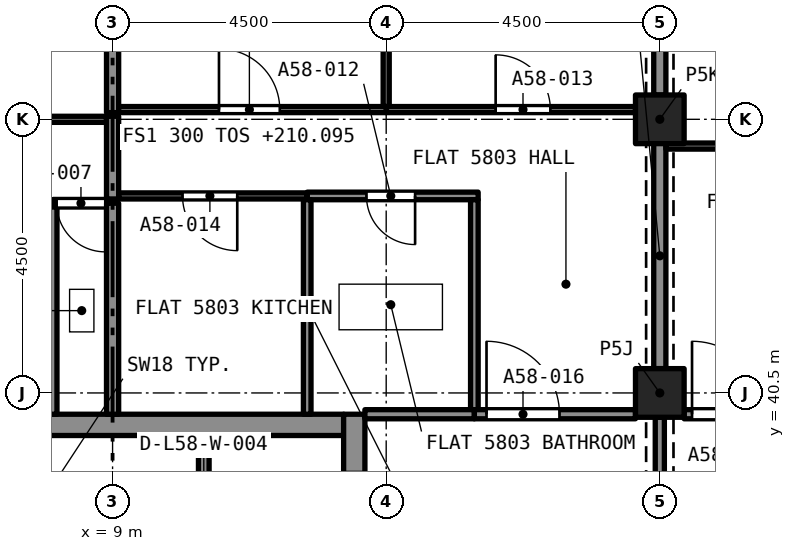
"""IFC4 building model, lengths in metres.
Left out: names, types, materials, properties, quantities, classifications, styles, units other than length and angle.
Written with IfcOpenShell. Run it as: python <this file> out.ifc"""

import sys

from ifc_helpers import new_model, si_unit, direction, frame, frame_2d, origin, origin_2d, place, context, subcontext, project, spatial, rectangle, extrude, element, fill, save


model = new_model("IFC4")
c1 = context("Model", 3, precision=1e-05, world=origin(), true_north=direction((0.0, 1.0)))
c2 = subcontext(c1, "Body", "Model", "MODEL_VIEW")
j1 = project(units=[si_unit("LENGTHUNIT", "METRE"), si_unit("PLANEANGLEUNIT", "RADIAN")], contexts=[c1])
p1 = place(None, origin())
s1 = spatial("IfcSite", under=j1, at=p1, CompositionType="ELEMENT")
p2 = place(p1, origin())
s2 = spatial("IfcBuilding", under=s1, at=p2, CompositionType="ELEMENT")
p3 = place(p2, frame((0.0, 0.0, 210.095)))
s3 = spatial("IfcBuildingStorey", under=s2, at=p3, CompositionType="ELEMENT", Elevation=210.095)
for number, where, z_axis, x_axis in (
    (1, (18.0, 40.5, 0.0), (0.0, 0.0, 1.0), (1.0, 0.0, 0.0)),
    (2, (18.0, 45.0, 0.0), (0.0, 0.0, 1.0), (1.0, 0.0, 0.0)),
):
    element("IfcColumn", number, at=place(p3, frame(where, z_axis=z_axis, x_axis=x_axis)), inside=s3, PredefinedType="COLUMN", context=c2, shape_type="SweptSolid", body=[
        extrude(rectangle(XDim=0.8, YDim=0.8, at=origin_2d()), origin(), (0.0, 0.0, 1.0), 3.2),
    ])
p4 = place(p3, frame((5.2, 39.975, 0.0), z_axis=(0.0, 0.0, 1.0), x_axis=(1.0, 0.0, 0.0)))
e3 = element("IfcWall", 3, at=p4, inside=s3, PredefinedType="SOLIDWALL", context=c2, shape_type="SweptSolid", body=[
    extrude(rectangle(XDim=7.6, YDim=0.35, at=frame_2d((3.8, 0.0))), origin(), (0.0, 0.0, 1.0), 3.2),
])
p5 = place(p3, frame((12.975, 27.35, 0.0), z_axis=(0.0, 0.0, 1.0), x_axis=(0.0, 1.0, 0.0)))
e4 = element("IfcWall", 4, at=p5, inside=s3, PredefinedType="SOLIDWALL", context=c2, shape_type="SweptSolid", body=[
    extrude(rectangle(XDim=12.8, YDim=0.35, at=frame_2d((6.4, 0.0))), origin(), (0.0, 0.0, 1.0), 3.2),
])
p6 = place(p5, frame((10.75, 0.0, 0.0)))
e5 = element("IfcOpeningElement", 5, at=p6, cuts=e4, PredefinedType="OPENING", context=c2, shape_type="SweptSolid", body=[
    extrude(rectangle(XDim=1.1, YDim=2.1, at=frame_2d((0.55, 1.05))), frame((0.0, 0.185, 0.0), z_axis=(0.0, -1.0, 0.0), x_axis=(1.0, 0.0, 0.0)), (0.0, 0.0, 1.0), 0.37),
])
p7 = place(p5, frame((8.6, 0.0, 0.0)))
e6 = element("IfcOpeningElement", 6, at=p7, cuts=e4, PredefinedType="OPENING", context=c2, shape_type="SweptSolid", body=[
    extrude(rectangle(XDim=1.2, YDim=2.1, at=frame_2d((0.6, 1.05))), frame((0.0, 0.185, 0.0), z_axis=(0.0, -1.0, 0.0), x_axis=(1.0, 0.0, 0.0)), (0.0, 0.0, 1.0), 0.37),
])
p8 = place(p3, frame((9.0, 43.62, 0.0), z_axis=(0.0, 0.0, 1.0), x_axis=(-1.0, 0.0, 0.0)))
e7 = element("IfcWall", 7, at=p8, inside=s3, PredefinedType="PARTITIONING", context=c2, shape_type="SweptSolid", body=[
    extrude(rectangle(XDim=0.977, YDim=0.125, at=frame_2d((0.489, 0.0))), origin(), (0.0, 0.0, 1.0), 2.9),
])
p9 = place(p8, frame((0.12, 0.0, 0.0)))
e8 = element("IfcOpeningElement", 8, at=p9, cuts=e7, PredefinedType="OPENING", context=c2, shape_type="SweptSolid", body=[
    extrude(rectangle(XDim=0.8, YDim=2.1, at=frame_2d((0.4, 1.05))), frame((0.0, 0.073, 0.0), z_axis=(0.0, -1.0, 0.0), x_axis=(1.0, 0.0, 0.0)), (0.0, 0.0, 1.0), 0.145),
])
p10 = place(p3, frame((8.023, 40.15, 0.0), z_axis=(0.0, 0.0, 1.0), x_axis=(0.0, 1.0, 0.0)))
e9 = element("IfcWall", 9, at=p10, inside=s3, PredefinedType="PARTITIONING", context=c2, shape_type="SweptSolid", body=[
    extrude(rectangle(XDim=3.408, YDim=0.125, at=frame_2d((1.704, 0.0))), origin(), (0.0, 0.0, 1.0), 2.9),
])
p11 = place(p3, frame((9.0, 40.15, 0.0), z_axis=(0.0, 0.0, 1.0), x_axis=(0.0, 1.0, 0.0)))
e10 = element("IfcWall", 10, at=p11, inside=s3, PredefinedType="PARTITIONING", context=c2, shape_type="SweptSolid", body=[
    extrude(rectangle(XDim=3.47, YDim=0.2, at=frame_2d((1.735, 0.0))), origin(), (0.0, 0.0, 1.0), 2.9),
])
p12 = place(p3, frame((4.5, 45.0, 0.0), z_axis=(0.0, 0.0, 1.0), x_axis=(1.0, 0.0, 0.0)))
e11 = element("IfcWall", 11, at=p12, inside=s3, PredefinedType="PARTITIONING", context=c2, shape_type="SweptSolid", body=[
    extrude(rectangle(XDim=4.4, YDim=0.1, at=frame_2d((2.2, 0.0))), origin(), (0.0, 0.0, 1.0), 2.9),
])
p13 = place(p12, frame((1.8, 0.0, 0.0)))
e12 = element("IfcOpeningElement", 12, at=p13, cuts=e11, PredefinedType="OPENING", context=c2, shape_type="SweptSolid", body=[
    extrude(rectangle(XDim=0.9, YDim=2.1, at=frame_2d((0.45, 1.05))), frame((0.0, 0.06, 0.0), z_axis=(0.0, -1.0, 0.0), x_axis=(1.0, 0.0, 0.0)), (0.0, 0.0, 1.0), 0.12),
])
p14 = place(p3, frame((9.0, 45.11, 0.0), z_axis=(0.0, 0.0, 1.0), x_axis=(0.0, 1.0, 0.0)))
e13 = element("IfcWall", 13, at=p14, inside=s3, PredefinedType="PARTITIONING", context=c2, shape_type="SweptSolid", body=[
    extrude(rectangle(XDim=3.99, YDim=0.2, at=frame_2d((1.995, 0.0))), origin(), (0.0, 0.0, 1.0), 2.9),
])
p15 = place(p3, frame((8.023, 43.62, 0.0), z_axis=(0.0, 0.0, 1.0), x_axis=(-1.0, 0.0, 0.0)))
e14 = element("IfcWall", 14, at=p15, inside=s3, PredefinedType="PARTITIONING", context=c2, shape_type="SweptSolid", body=[
    extrude(rectangle(XDim=1.223, YDim=0.1, at=frame_2d((0.611, 0.0))), origin(), (0.0, 0.0, 1.0), 2.9),
])
p16 = place(p15, frame((0.136, 0.0, 0.0)))
e15 = element("IfcOpeningElement", 15, at=p16, cuts=e14, PredefinedType="OPENING", context=c2, shape_type="SweptSolid", body=[
    extrude(rectangle(XDim=0.9, YDim=2.1, at=frame_2d((0.45, 1.05))), frame((0.0, 0.06, 0.0), z_axis=(0.0, -1.0, 0.0), x_axis=(1.0, 0.0, 0.0)), (0.0, 0.0, 1.0), 0.12),
])
p17 = place(p3, frame((9.0, 43.69, 0.0), z_axis=(0.0, 0.0, 1.0), x_axis=(0.0, 1.0, 0.0)))
e16 = element("IfcWall", 16, at=p17, inside=s3, PredefinedType="PARTITIONING", context=c2, shape_type="SweptSolid", body=[
    extrude(rectangle(XDim=1.36, YDim=0.2, at=frame_2d((0.68, 0.0))), origin(), (0.0, 0.0, 1.0), 2.9),
])
p18 = place(p3, frame((15.012, 43.74, 0.0), z_axis=(0.0, 0.0, 1.0), x_axis=(-1.0, 0.0, 0.0)))
e17 = element("IfcWall", 17, at=p18, inside=s3, PredefinedType="PARTITIONING", context=c2, shape_type="SweptSolid", body=[
    extrude(rectangle(XDim=2.812, YDim=0.125, at=frame_2d((1.406, 0.0))), origin(), (0.0, 0.0, 1.0), 2.9),
])
p19 = place(p18, frame((1.037, 0.0, 0.0)))
e18 = element("IfcOpeningElement", 18, at=p19, cuts=e17, PredefinedType="OPENING", context=c2, shape_type="SweptSolid", body=[
    extrude(rectangle(XDim=0.8, YDim=2.1, at=frame_2d((0.4, 1.05))), frame((0.0, 0.073, 0.0), z_axis=(0.0, -1.0, 0.0), x_axis=(1.0, 0.0, 0.0)), (0.0, 0.0, 1.0), 0.145),
])
p20 = place(p3, frame((14.95, 40.225, 0.0), z_axis=(0.0, 0.0, 1.0), x_axis=(0.0, 1.0, 0.0)))
e19 = element("IfcWall", 19, at=p20, inside=s3, PredefinedType="PARTITIONING", context=c2, shape_type="SweptSolid", body=[
    extrude(rectangle(XDim=3.452, YDim=0.125, at=frame_2d((1.726, 0.0))), origin(), (0.0, 0.0, 1.0), 2.9),
])
p21 = place(p3, frame((12.201, 40.15, 0.0), z_axis=(0.0, 0.0, 1.0), x_axis=(0.0, 1.0, 0.0)))
e20 = element("IfcWall", 20, at=p21, inside=s3, PredefinedType="PARTITIONING", context=c2, shape_type="SweptSolid", body=[
    extrude(rectangle(XDim=3.528, YDim=0.125, at=frame_2d((1.764, 0.0))), origin(), (0.0, 0.0, 1.0), 2.9),
])
p22 = place(p3, frame((13.15, 40.15, 0.0), z_axis=(0.0, 0.0, 1.0), x_axis=(1.0, 0.0, 0.0)))
e21 = element("IfcWall", 21, at=p22, inside=s3, PredefinedType="PARTITIONING", context=c2, shape_type="SweptSolid", body=[
    extrude(rectangle(XDim=1.8, YDim=0.15, at=frame_2d((0.9, 0.0))), origin(), (0.0, 0.0, 1.0), 2.9),
])
p23 = place(p3, frame((13.5, 45.16, 0.0), z_axis=(0.0, 0.0, 1.0), x_axis=(1.0, 0.0, 0.0)))
e22 = element("IfcWall", 22, at=p23, inside=s3, PredefinedType="PARTITIONING", context=c2, shape_type="SweptSolid", body=[
    extrude(rectangle(XDim=4.1, YDim=0.1, at=frame_2d((2.05, 0.0))), origin(), (0.0, 0.0, 1.0), 2.9),
])
p24 = place(p23, frame((1.8, 0.0, 0.0)))
e23 = element("IfcOpeningElement", 23, at=p24, cuts=e22, PredefinedType="OPENING", context=c2, shape_type="SweptSolid", body=[
    extrude(rectangle(XDim=0.9, YDim=2.1, at=frame_2d((0.45, 1.05))), frame((0.0, 0.06, 0.0), z_axis=(0.0, -1.0, 0.0), x_axis=(1.0, 0.0, 0.0)), (0.0, 0.0, 1.0), 0.12),
])
p25 = place(p3, frame((13.5, 45.21, 0.0), z_axis=(0.0, 0.0, 1.0), x_axis=(0.0, 1.0, 0.0)))
e24 = element("IfcWall", 24, at=p25, inside=s3, PredefinedType="PARTITIONING", context=c2, shape_type="SweptSolid", body=[
    extrude(rectangle(XDim=3.89, YDim=0.1, at=frame_2d((1.945, 0.0))), origin(), (0.0, 0.0, 1.0), 2.9),
])
p26 = place(p3, frame((18.0, 45.4, 0.0), z_axis=(0.0, 0.0, 1.0), x_axis=(0.0, 1.0, 0.0)))
e25 = element("IfcWall", 25, at=p26, inside=s3, PredefinedType="PARTITIONING", context=c2, shape_type="SweptSolid", body=[
    extrude(rectangle(XDim=3.7, YDim=0.2, at=frame_2d((1.85, 0.0))), origin(), (0.0, 0.0, 1.0), 2.38),
])
p27 = place(p3, frame((12.201, 43.74, 0.0), z_axis=(0.0, 0.0, 1.0), x_axis=(-1.0, 0.0, 0.0)))
e26 = element("IfcWall", 26, at=p27, inside=s3, PredefinedType="PARTITIONING", context=c2, shape_type="SweptSolid", body=[
    extrude(rectangle(XDim=3.101, YDim=0.1, at=frame_2d((1.55, 0.0))), origin(), (0.0, 0.0, 1.0), 2.9),
])
p28 = place(p27, frame((1.15, 0.0, 0.0)))
e27 = element("IfcOpeningElement", 27, at=p28, cuts=e26, PredefinedType="OPENING", context=c2, shape_type="SweptSolid", body=[
    extrude(rectangle(XDim=0.9, YDim=2.1, at=frame_2d((0.45, 1.05))), frame((0.0, 0.06, 0.0), z_axis=(0.0, -1.0, 0.0), x_axis=(1.0, 0.0, 0.0)), (0.0, 0.0, 1.0), 0.12),
])
p29 = place(p3, frame((9.1, 45.16, 0.0), z_axis=(0.0, 0.0, 1.0), x_axis=(1.0, 0.0, 0.0)))
e28 = element("IfcWall", 28, at=p29, inside=s3, PredefinedType="PARTITIONING", context=c2, shape_type="SweptSolid", body=[
    extrude(rectangle(XDim=4.4, YDim=0.1, at=frame_2d((2.2, 0.0))), origin(), (0.0, 0.0, 1.0), 2.9),
])
p30 = place(p29, frame((1.65, 0.0, 0.0)))
e29 = element("IfcOpeningElement", 29, at=p30, cuts=e28, PredefinedType="OPENING", context=c2, shape_type="SweptSolid", body=[
    extrude(rectangle(XDim=1.0, YDim=2.1, at=frame_2d((0.5, 1.05))), frame((0.0, 0.06, 0.0), z_axis=(0.0, -1.0, 0.0), x_axis=(1.0, 0.0, 0.0)), (0.0, 0.0, 1.0), 0.12),
])
p31 = place(p3, frame((18.0, 40.9, 0.0), z_axis=(0.0, 0.0, 1.0), x_axis=(0.0, 1.0, 0.0)))
e30 = element("IfcWall", 30, at=p31, inside=s3, PredefinedType="PARTITIONING", context=c2, shape_type="SweptSolid", body=[
    extrude(rectangle(XDim=3.71, YDim=0.2, at=frame_2d((1.855, 0.0))), origin(), (0.0, 0.0, 1.0), 2.38),
])
p32 = place(p3, frame((14.95, 40.15, 0.0), z_axis=(0.0, 0.0, 1.0), x_axis=(1.0, 0.0, 0.0)))
e31 = element("IfcWall", 31, at=p32, inside=s3, PredefinedType="PARTITIONING", context=c2, shape_type="SweptSolid", body=[
    extrude(rectangle(XDim=2.65, YDim=0.15, at=frame_2d((1.325, 0.0))), origin(), (0.0, 0.0, 1.0), 2.9),
])
p33 = place(p32, frame((0.2, 0.0, 0.0)))
e32 = element("IfcOpeningElement", 32, at=p33, cuts=e31, PredefinedType="OPENING", context=c2, shape_type="SweptSolid", body=[
    extrude(rectangle(XDim=1.2, YDim=2.4, at=frame_2d((0.6, 1.2))), frame((0.0, 0.085, 0.0), z_axis=(0.0, -1.0, 0.0), x_axis=(1.0, 0.0, 0.0)), (0.0, 0.0, 1.0), 0.17),
])
p34 = place(p3, frame((18.1, 44.56, 0.0), z_axis=(0.0, 0.0, 1.0), x_axis=(1.0, 0.0, 0.0)))
e33 = element("IfcWall", 33, at=p34, inside=s3, PredefinedType="PARTITIONING", context=c2, shape_type="SweptSolid", body=[
    extrude(rectangle(XDim=4.4, YDim=0.1, at=frame_2d((2.2, 0.0))), origin(), (0.0, 0.0, 1.0), 2.75),
])
p35 = place(p34, frame((1.7, 0.0, 0.0)))
e34 = element("IfcOpeningElement", 34, at=p35, cuts=e33, PredefinedType="OPENING", context=c2, shape_type="SweptSolid", body=[
    extrude(rectangle(XDim=0.9, YDim=2.1, at=frame_2d((0.45, 1.05))), frame((0.0, 0.06, 0.0), z_axis=(0.0, -1.0, 0.0), x_axis=(1.0, 0.0, 0.0)), (0.0, 0.0, 1.0), 0.12),
])
p36 = place(p3, frame((18.4, 40.15, 0.0), z_axis=(0.0, 0.0, 1.0), x_axis=(1.0, 0.0, 0.0)))
e35 = element("IfcWall", 35, at=p36, inside=s3, PredefinedType="PARTITIONING", context=c2, shape_type="SweptSolid", body=[
    extrude(rectangle(XDim=1.95, YDim=0.15, at=frame_2d((0.975, 0.0))), origin(), (0.0, 0.0, 1.0), 2.75),
])
p37 = place(p36, frame((0.13, 0.0, 0.0)))
e36 = element("IfcOpeningElement", 36, at=p37, cuts=e35, PredefinedType="OPENING", context=c2, shape_type="SweptSolid", body=[
    extrude(rectangle(XDim=1.2, YDim=2.4, at=frame_2d((0.6, 1.2))), frame((0.0, 0.085, 0.0), z_axis=(0.0, -1.0, 0.0), x_axis=(1.0, 0.0, 0.0)), (0.0, 0.0, 1.0), 0.17),
])
p38 = place(p3, frame((18.0, 40.1, 0.0), z_axis=(0.0, 0.0, 1.0), x_axis=(0.0, -1.0, 0.0)))
e37 = element("IfcWall", 37, at=p38, inside=s3, PredefinedType="PARTITIONING", context=c2, shape_type="SweptSolid", body=[
    extrude(rectangle(XDim=3.7, YDim=0.15, at=frame_2d((1.85, 0.0))), origin(), (0.0, 0.0, 1.0), 2.38),
])
p39 = place(p38, frame((1.25, 0.0, 0.0)))
e38 = element("IfcOpeningElement", 38, at=p39, cuts=e37, PredefinedType="OPENING", context=c2, shape_type="SweptSolid", body=[
    extrude(rectangle(XDim=1.2, YDim=2.1, at=frame_2d((0.6, 1.05))), frame((0.0, 0.085, 0.0), z_axis=(0.0, -1.0, 0.0), x_axis=(1.0, 0.0, 0.0)), (0.0, 0.0, 1.0), 0.17),
])
p40 = place(p3, frame((10.5, 37.5, 0.0), z_axis=(0.0, 0.0, 1.0), x_axis=(0.0, 1.0, 0.0)))
e39 = element("IfcWall", 39, at=p40, inside=s3, PredefinedType="SOLIDWALL", context=c2, shape_type="SweptSolid", body=[
    extrude(rectangle(XDim=2.3, YDim=0.175, at=frame_2d((1.15, 0.0))), origin(), (0.0, 0.0, 1.0), 2.9),
])
p41 = place(p40, frame((0.65, 0.0, 0.0)))
e40 = element("IfcOpeningElement", 40, at=p41, cuts=e39, PredefinedType="OPENING", context=c2, shape_type="SweptSolid", body=[
    extrude(rectangle(XDim=1.0, YDim=2.1, at=frame_2d((0.5, 1.05))), frame((0.0, 0.097, 0.0), z_axis=(0.0, -1.0, 0.0), x_axis=(1.0, 0.0, 0.0)), (0.0, 0.0, 1.0), 0.195),
])
p42 = place(p9, origin())
e41 = element("IfcDoor", 41, at=p42, inside=s3, OperationType="SINGLE_SWING_LEFT", PredefinedType="DOOR", context=c2, shape_type="SweptSolid", body=[
    extrude(rectangle(XDim=0.8, YDim=2.1, at=frame_2d((0.4, 1.05))), frame((0.0, 0.025, 0.0), z_axis=(0.0, -1.0, 0.0), x_axis=(1.0, 0.0, 0.0)), (0.0, 0.0, 1.0), 0.05),
])
fill(e8, e41)
p43 = place(p19, origin())
e42 = element("IfcDoor", 42, at=p43, inside=s3, OperationType="SINGLE_SWING_RIGHT", PredefinedType="DOOR", context=c2, shape_type="SweptSolid", body=[
    extrude(rectangle(XDim=0.8, YDim=2.1, at=frame_2d((0.4, 1.05))), frame((0.0, 0.025, 0.0), z_axis=(0.0, -1.0, 0.0), x_axis=(1.0, 0.0, 0.0)), (0.0, 0.0, 1.0), 0.05),
])
fill(e18, e42)
p44 = place(p24, origin())
e43 = element("IfcDoor", 43, at=p44, inside=s3, OperationType="SINGLE_SWING_RIGHT", PredefinedType="DOOR", context=c2, shape_type="SweptSolid", body=[
    extrude(rectangle(XDim=0.9, YDim=2.1, at=frame_2d((0.45, 1.05))), frame((0.0, 0.025, 0.0), z_axis=(0.0, -1.0, 0.0), x_axis=(1.0, 0.0, 0.0)), (0.0, 0.0, 1.0), 0.05),
])
fill(e23, e43)
p45 = place(p28, origin())
e44 = element("IfcDoor", 44, at=p45, inside=s3, OperationType="SINGLE_SWING_RIGHT", PredefinedType="DOOR", context=c2, shape_type="SweptSolid", body=[
    extrude(rectangle(XDim=0.9, YDim=2.1, at=frame_2d((0.45, 1.05))), frame((0.0, 0.025, 0.0), z_axis=(0.0, -1.0, 0.0), x_axis=(1.0, 0.0, 0.0)), (0.0, 0.0, 1.0), 0.05),
])
fill(e27, e44)
p46 = place(p30, origin())
e45 = element("IfcDoor", 45, at=p46, inside=s3, OperationType="SINGLE_SWING_LEFT", PredefinedType="DOOR", context=c2, shape_type="SweptSolid", body=[
    extrude(rectangle(XDim=1.0, YDim=2.1, at=frame_2d((0.5, 1.05))), frame((0.0, 0.025, 0.0), z_axis=(0.0, -1.0, 0.0), x_axis=(1.0, 0.0, 0.0)), (0.0, 0.0, 1.0), 0.05),
])
fill(e29, e45)
p47 = place(p33, origin())
e46 = element("IfcDoor", 46, at=p47, inside=s3, OperationType="SINGLE_SWING_LEFT", PredefinedType="DOOR", context=c2, shape_type="SweptSolid", body=[
    extrude(rectangle(XDim=1.2, YDim=2.4, at=frame_2d((0.6, 1.2))), frame((0.0, 0.025, 0.0), z_axis=(0.0, -1.0, 0.0), x_axis=(1.0, 0.0, 0.0)), (0.0, 0.0, 1.0), 0.05),
])
fill(e32, e46)
p48 = place(p37, origin())
e47 = element("IfcDoor", 47, at=p48, inside=s3, OperationType="SINGLE_SWING_LEFT", PredefinedType="DOOR", context=c2, shape_type="SweptSolid", body=[
    extrude(rectangle(XDim=1.2, YDim=2.4, at=frame_2d((0.6, 1.2))), frame((0.0, 0.025, 0.0), z_axis=(0.0, -1.0, 0.0), x_axis=(1.0, 0.0, 0.0)), (0.0, 0.0, 1.0), 0.05),
])
fill(e36, e47)
save(model, sys.argv[1])
